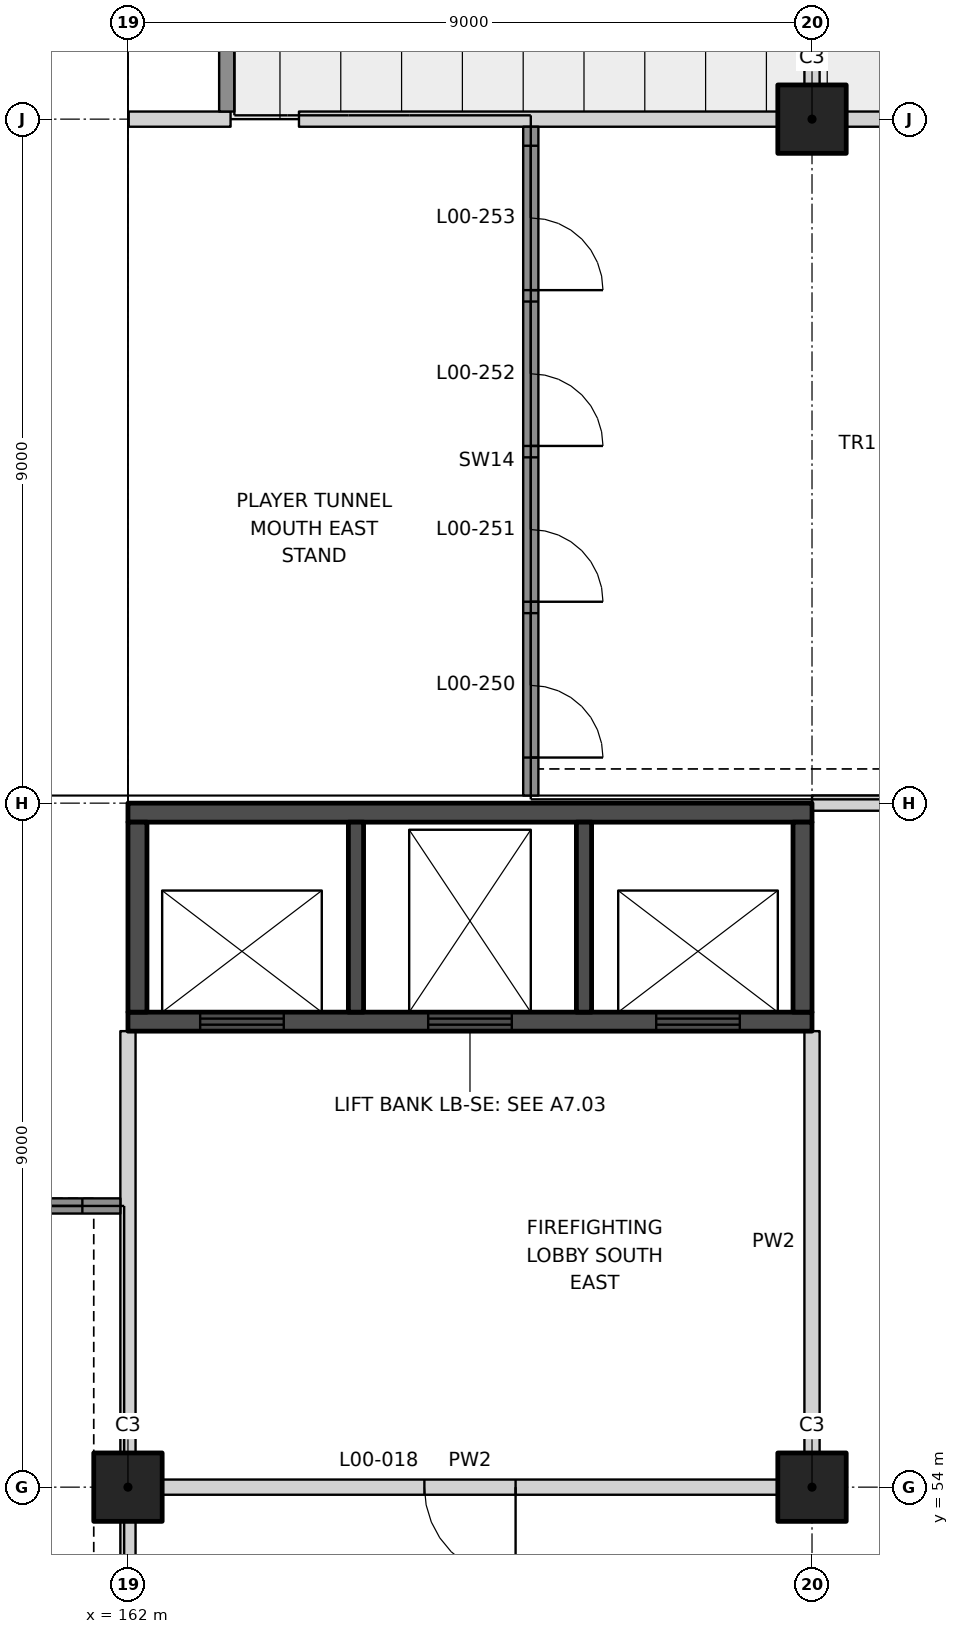
"""IFC4 building model, lengths in metres.
Left out: names, types, materials, properties, quantities, classifications, styles, units other than length and angle.
Written with IfcOpenShell. Run it as: python <this file> out.ifc"""

import sys

from ifc_helpers import new_model, si_unit, direction, frame, frame_2d, origin, origin_2d, place, context, subcontext, project, spatial, polyline, rectangle, outline, extrude, element, fill, save


model = new_model("IFC4")
c1 = context("Model", 3, precision=1e-05, world=origin(), true_north=direction((0.0, 1.0)))
c2 = subcontext(c1, "Body", "Model", "MODEL_VIEW")
j1 = project(units=[si_unit("LENGTHUNIT", "METRE"), si_unit("PLANEANGLEUNIT", "RADIAN")], contexts=[c1])
p1 = place(None, origin())
s1 = spatial("IfcSite", under=j1, at=p1, CompositionType="ELEMENT")
p2 = place(p1, origin())
s2 = spatial("IfcBuilding", under=s1, at=p2, CompositionType="ELEMENT")
p3 = place(p2, origin())
s3 = spatial("IfcBuildingStorey", under=s2, at=p3, CompositionType="ELEMENT", Elevation=0.0)
for number, where, z_axis, x_axis in (
    (1, (162.0, 54.0, 0.0), (0.0, 0.0, 1.0), (1.0, 0.0, 0.0)),
    (2, (171.0, 54.0, 0.0), (0.0, 0.0, 1.0), (1.0, 0.0, 0.0)),
):
    element("IfcColumn", number, at=place(p3, frame(where, z_axis=z_axis, x_axis=x_axis)), inside=s3, PredefinedType="COLUMN", context=c2, shape_type="SweptSolid", body=[
        extrude(rectangle(XDim=0.9, YDim=0.9, at=origin_2d()), origin(), (0.0, 0.0, 1.0), 7.0),
    ])
p4 = place(p3, frame((171.0, 72.0, 0.0), z_axis=(0.0, 0.0, 1.0), x_axis=(1.0, 0.0, 0.0)))
e3 = element("IfcColumn", 3, at=p4, inside=s3, PredefinedType="COLUMN", context=c2, shape_type="SweptSolid", body=[
    extrude(rectangle(XDim=0.9, YDim=0.9, at=origin_2d()), origin(), (0.0, 0.0, 1.0), 3.552),
])
p5 = place(p3, frame((162.45, 54.0, 0.0), z_axis=(0.0, 0.0, 1.0), x_axis=(1.0, 0.0, 0.0)))
e4 = element("IfcWall", 4, at=p5, inside=s3, PredefinedType="PARTITIONING", context=c2, shape_type="SweptSolid", body=[
    extrude(rectangle(XDim=8.1, YDim=0.2, at=frame_2d((4.05, 0.0))), origin(), (0.0, 0.0, 1.0), 5.75),
])
p6 = place(p5, frame((3.45, 0.0, 0.0)))
e5 = element("IfcOpeningElement", 5, at=p6, cuts=e4, PredefinedType="OPENING", context=c2, shape_type="SweptSolid", body=[
    extrude(rectangle(XDim=1.2, YDim=2.1, at=frame_2d((0.6, 1.05))), frame((0.0, 0.11, 0.0), z_axis=(0.0, -1.0, 0.0), x_axis=(1.0, 0.0, 0.0)), (0.0, 0.0, 1.0), 0.22),
])
p7 = place(p3, frame((171.0, 63.0, 0.0), z_axis=(0.0, 0.0, 1.0), x_axis=(1.0, 0.0, 0.0)))
e6 = element("IfcWall", 6, at=p7, inside=s3, PredefinedType="PARTITIONING", context=c2, shape_type="SweptSolid", body=[
    extrude(rectangle(XDim=5.429, YDim=0.2, at=frame_2d((2.714, 0.0))), origin(), (0.0, 0.0, 1.0), 3.439),
])
p8 = place(p7, frame((3.6, 0.0, 0.0)))
e7 = element("IfcOpeningElement", 7, at=p8, cuts=e6, PredefinedType="OPENING", context=c2, shape_type="SweptSolid", body=[
    extrude(rectangle(XDim=1.8, YDim=2.1, at=frame_2d((0.9, 1.05))), frame((0.0, 0.11, 0.0), z_axis=(0.0, -1.0, 0.0), x_axis=(1.0, 0.0, 0.0)), (0.0, 0.0, 1.0), 0.22),
])
p9 = place(p3, frame((164.25, 72.0, 0.0), z_axis=(0.0, 0.0, 1.0), x_axis=(1.0, 0.0, 0.0)))
e8 = element("IfcWall", 8, at=p9, inside=s3, PredefinedType="PARTITIONING", context=c2, shape_type="SweptSolid", body=[
    extrude(outline(polyline([(0.0, 0.0), (6.3, 0.0), (6.3, 3.231), (4.362, 2.311), (0.0, 0.239), (0.0, 0.0)])), frame((0.0, 0.1, 0.0), z_axis=(0.0, -1.0, 0.0), x_axis=(1.0, 0.0, 0.0)), (0.0, 0.0, 1.0), 0.2),
])
p10 = place(p3, frame((162.01, 72.0, 0.0), z_axis=(0.0, 0.0, 1.0), x_axis=(1.0, 0.0, 0.0)))
e9 = element("IfcWall", 9, at=p10, inside=s3, PredefinedType="PARTITIONING", context=c2, shape_type="SweptSolid", body=[
    extrude(outline(polyline([(0.0, 0.0), (1.34, 0.0), (1.34, -0.189), (0.893, 7.0), (0.0, 7.0), (0.0, 0.0)])), frame((0.0, 0.1, 0.0), z_axis=(0.0, -1.0, 0.0), x_axis=(1.0, 0.0, 0.0)), (0.0, 0.0, 1.0), 0.2),
])
p11 = place(p3, frame((171.45, 72.0, 0.0), z_axis=(0.0, 0.0, 1.0), x_axis=(1.0, 0.0, 0.0)))
e10 = element("IfcWall", 10, at=p11, inside=s3, PredefinedType="PARTITIONING", context=c2, shape_type="SweptSolid", body=[
    extrude(rectangle(XDim=4.979, YDim=0.2, at=frame_2d((2.49, 0.0))), origin(), (0.0, 0.0, 1.0), 3.439),
])
p12 = place(p11, frame((3.125, 0.0, 0.0)))
e11 = element("IfcOpeningElement", 11, at=p12, cuts=e10, PredefinedType="OPENING", context=c2, shape_type="SweptSolid", body=[
    extrude(rectangle(XDim=1.8, YDim=2.1, at=frame_2d((0.9, 1.05))), frame((0.0, 0.11, 0.0), z_axis=(0.0, -1.0, 0.0), x_axis=(1.0, 0.0, 0.0)), (0.0, 0.0, 1.0), 0.22),
])
p13 = place(p3, frame((162.0, 48.571, 0.0), z_axis=(0.0, 0.0, 1.0), x_axis=(0.0, 1.0, 0.0)))
e12 = element("IfcWall", 12, at=p13, inside=s3, PredefinedType="PARTITIONING", context=c2, shape_type="SweptSolid", body=[
    extrude(rectangle(XDim=4.979, YDim=0.2, at=frame_2d((2.49, 0.0))), origin(), (0.0, 0.0, 1.0), 3.439),
])
for number, where, z_axis, x_axis in (
    (13, (162.0, 54.45, 0.0), (0.0, 0.0, 1.0), (0.0, 1.0, 0.0)),
    (14, (171.0, 54.45, 0.0), (0.0, 0.0, 1.0), (0.0, 1.0, 0.0)),
):
    element("IfcWall", number, at=place(p3, frame(where, z_axis=z_axis, x_axis=x_axis)), inside=s3, PredefinedType="PARTITIONING", context=c2, shape_type="SweptSolid", body=[
        extrude(rectangle(XDim=5.55, YDim=0.2, at=frame_2d((2.775, 0.0))), origin(), (0.0, 0.0, 1.0), 5.95),
    ])
p14 = place(p3, frame((171.0, 72.45, 0.0), z_axis=(0.0, 0.0, 1.0), x_axis=(0.0, 1.0, 0.0)))
e15 = element("IfcWall", 15, at=p14, inside=s3, PredefinedType="PARTITIONING", context=c2, shape_type="SweptSolid", body=[
    extrude(rectangle(XDim=8.1, YDim=0.2, at=frame_2d((4.05, 0.0))), origin(), (0.0, 0.0, 1.0), 4.445),
])
p15 = place(p3, frame((162.0, 60.125, 0.0), z_axis=(0.0, 0.0, 1.0), x_axis=(1.0, 0.0, 0.0)))
e16 = element("IfcWall", 16, at=p15, inside=s3, PredefinedType="SHEAR", context=c2, shape_type="SweptSolid", body=[
    extrude(rectangle(XDim=9.0, YDim=0.25, at=frame_2d((4.5, 0.0))), origin(), (0.0, 0.0, 1.0), 7.0),
])
p16 = place(p15, frame((0.95, 0.0, 0.0)))
e17 = element("IfcOpeningElement", 17, at=p16, cuts=e16, PredefinedType="OPENING", context=c2, shape_type="SweptSolid", body=[
    extrude(rectangle(XDim=1.1, YDim=2.1, at=frame_2d((0.55, 1.05))), frame((0.0, 0.135, 0.0), z_axis=(0.0, -1.0, 0.0), x_axis=(1.0, 0.0, 0.0)), (0.0, 0.0, 1.0), 0.27),
])
p17 = place(p15, frame((3.95, 0.0, 0.0)))
e18 = element("IfcOpeningElement", 18, at=p17, cuts=e16, PredefinedType="OPENING", context=c2, shape_type="SweptSolid", body=[
    extrude(rectangle(XDim=1.1, YDim=2.1, at=frame_2d((0.55, 1.05))), frame((0.0, 0.135, 0.0), z_axis=(0.0, -1.0, 0.0), x_axis=(1.0, 0.0, 0.0)), (0.0, 0.0, 1.0), 0.27),
])
p18 = place(p15, frame((6.95, 0.0, 0.0)))
e19 = element("IfcOpeningElement", 19, at=p18, cuts=e16, PredefinedType="OPENING", context=c2, shape_type="SweptSolid", body=[
    extrude(rectangle(XDim=1.1, YDim=2.1, at=frame_2d((0.55, 1.05))), frame((0.0, 0.135, 0.0), z_axis=(0.0, -1.0, 0.0), x_axis=(1.0, 0.0, 0.0)), (0.0, 0.0, 1.0), 0.27),
])
p19 = place(p3, frame((162.0, 62.875, 0.0), z_axis=(0.0, 0.0, 1.0), x_axis=(1.0, 0.0, 0.0)))
e20 = element("IfcWall", 20, at=p19, inside=s3, PredefinedType="SHEAR", context=c2, shape_type="SweptSolid", body=[
    extrude(rectangle(XDim=9.0, YDim=0.25, at=frame_2d((4.5, 0.0))), origin(), (0.0, 0.0, 1.0), 7.0),
])
for number, where, z_axis, x_axis in (
    (21, (162.125, 60.25, 0.0), (0.0, 0.0, 1.0), (0.0, 1.0, 0.0)),
    (22, (170.875, 60.25, 0.0), (0.0, 0.0, 1.0), (0.0, 1.0, 0.0)),
):
    element("IfcWall", number, at=place(p3, frame(where, z_axis=z_axis, x_axis=x_axis)), inside=s3, PredefinedType="SHEAR", context=c2, shape_type="SweptSolid", body=[
        extrude(rectangle(XDim=2.5, YDim=0.25, at=frame_2d((1.25, 0.0))), origin(), (0.0, 0.0, 1.0), 7.0),
    ])
for number, where, z_axis, x_axis in (
    (23, (165.0, 60.25, 0.0), (0.0, 0.0, 1.0), (0.0, 1.0, 0.0)),
    (24, (168.0, 60.25, 0.0), (0.0, 0.0, 1.0), (0.0, 1.0, 0.0)),
):
    element("IfcWall", number, at=place(p3, frame(where, z_axis=z_axis, x_axis=x_axis)), inside=s3, PredefinedType="SHEAR", context=c2, shape_type="SweptSolid", body=[
        extrude(rectangle(XDim=2.5, YDim=0.2, at=frame_2d((1.25, 0.0))), origin(), (0.0, 0.0, 1.0), 7.0),
    ])
p20 = place(p3, frame((153.1, 57.7, 0.0), z_axis=(0.0, 0.0, 1.0), x_axis=(1.0, 0.0, 0.0)))
e25 = element("IfcWall", 25, at=p20, inside=s3, PredefinedType="SOLIDWALL", context=c2, shape_type="SweptSolid", body=[
    extrude(rectangle(XDim=8.8, YDim=0.2, at=frame_2d((4.4, 0.0))), origin(), (0.0, 0.0, 1.0), 2.64),
])
p21 = place(p20, frame((0.25, 0.0, 0.0)))
e26 = element("IfcOpeningElement", 26, at=p21, cuts=e25, PredefinedType="OPENING", context=c2, shape_type="SweptSolid", body=[
    extrude(rectangle(XDim=1.9, YDim=2.1, at=frame_2d((0.95, 1.05))), frame((0.0, 0.11, 0.0), z_axis=(0.0, -1.0, 0.0), x_axis=(1.0, 0.0, 0.0)), (0.0, 0.0, 1.0), 0.22),
])
p22 = place(p20, frame((2.3, 0.0, 0.0)))
e27 = element("IfcOpeningElement", 27, at=p22, cuts=e25, PredefinedType="OPENING", context=c2, shape_type="SweptSolid", body=[
    extrude(rectangle(XDim=1.9, YDim=2.1, at=frame_2d((0.95, 1.05))), frame((0.0, 0.11, 0.0), z_axis=(0.0, -1.0, 0.0), x_axis=(1.0, 0.0, 0.0)), (0.0, 0.0, 1.0), 0.22),
])
p23 = place(p20, frame((4.35, 0.0, 0.0)))
e28 = element("IfcOpeningElement", 28, at=p23, cuts=e25, PredefinedType="OPENING", context=c2, shape_type="SweptSolid", body=[
    extrude(rectangle(XDim=1.9, YDim=2.1, at=frame_2d((0.95, 1.05))), frame((0.0, 0.11, 0.0), z_axis=(0.0, -1.0, 0.0), x_axis=(1.0, 0.0, 0.0)), (0.0, 0.0, 1.0), 0.22),
])
p24 = place(p20, frame((6.4, 0.0, 0.0)))
e29 = element("IfcOpeningElement", 29, at=p24, cuts=e25, PredefinedType="OPENING", context=c2, shape_type="SweptSolid", body=[
    extrude(rectangle(XDim=1.9, YDim=2.1, at=frame_2d((0.95, 1.05))), frame((0.0, 0.11, 0.0), z_axis=(0.0, -1.0, 0.0), x_axis=(1.0, 0.0, 0.0)), (0.0, 0.0, 1.0), 0.22),
])
p25 = place(p3, frame((167.3, 63.1, 0.0), z_axis=(0.0, 0.0, 1.0), x_axis=(0.0, 1.0, 0.0)))
e30 = element("IfcWall", 30, at=p25, inside=s3, PredefinedType="SOLIDWALL", context=c2, shape_type="SweptSolid", body=[
    extrude(rectangle(XDim=8.8, YDim=0.2, at=frame_2d((4.4, 0.0))), origin(), (0.0, 0.0, 1.0), 2.64),
])
p26 = place(p25, frame((0.5, 0.0, 0.0)))
e31 = element("IfcOpeningElement", 31, at=p26, cuts=e30, PredefinedType="OPENING", context=c2, shape_type="SweptSolid", body=[
    extrude(rectangle(XDim=1.9, YDim=2.1, at=frame_2d((0.95, 1.05))), frame((0.0, 0.11, 0.0), z_axis=(0.0, -1.0, 0.0), x_axis=(1.0, 0.0, 0.0)), (0.0, 0.0, 1.0), 0.22),
])
p27 = place(p25, frame((2.55, 0.0, 0.0)))
e32 = element("IfcOpeningElement", 32, at=p27, cuts=e30, PredefinedType="OPENING", context=c2, shape_type="SweptSolid", body=[
    extrude(rectangle(XDim=1.9, YDim=2.1, at=frame_2d((0.95, 1.05))), frame((0.0, 0.11, 0.0), z_axis=(0.0, -1.0, 0.0), x_axis=(1.0, 0.0, 0.0)), (0.0, 0.0, 1.0), 0.22),
])
p28 = place(p25, frame((4.6, 0.0, 0.0)))
e33 = element("IfcOpeningElement", 33, at=p28, cuts=e30, PredefinedType="OPENING", context=c2, shape_type="SweptSolid", body=[
    extrude(rectangle(XDim=1.9, YDim=2.1, at=frame_2d((0.95, 1.05))), frame((0.0, 0.11, 0.0), z_axis=(0.0, -1.0, 0.0), x_axis=(1.0, 0.0, 0.0)), (0.0, 0.0, 1.0), 0.22),
])
p29 = place(p25, frame((6.65, 0.0, 0.0)))
e34 = element("IfcOpeningElement", 34, at=p29, cuts=e30, PredefinedType="OPENING", context=c2, shape_type="SweptSolid", body=[
    extrude(rectangle(XDim=1.9, YDim=2.1, at=frame_2d((0.95, 1.05))), frame((0.0, 0.11, 0.0), z_axis=(0.0, -1.0, 0.0), x_axis=(1.0, 0.0, 0.0)), (0.0, 0.0, 1.0), 0.22),
])
p30 = place(p3, frame((163.3, 72.1, 0.0), z_axis=(0.0, 0.0, 1.0), x_axis=(0.0, 1.0, 0.0)))
e35 = element("IfcWall", 35, at=p30, inside=s3, PredefinedType="SOLIDWALL", context=c2, shape_type="SweptSolid", body=[
    extrude(rectangle(XDim=7.4, YDim=0.2, at=frame_2d((3.7, 0.0))), origin(), (0.0, 0.0, 1.0), 0.74),
])
p31 = place(p6, frame((1.2, 0.0, 0.0), z_axis=(0.0, 0.0, 1.0), x_axis=(-1.0, 0.0, 0.0)))
e36 = element("IfcDoor", 36, at=p31, inside=s3, OperationType="SINGLE_SWING_LEFT", PredefinedType="DOOR", context=c2, shape_type="SweptSolid", body=[
    extrude(rectangle(XDim=1.2, YDim=2.1, at=frame_2d((0.6, 1.05))), frame((0.0, 0.025, 0.0), z_axis=(0.0, -1.0, 0.0), x_axis=(1.0, 0.0, 0.0)), (0.0, 0.0, 1.0), 0.05),
])
fill(e5, e36)
p32 = place(p16, origin())
e37 = element("IfcDoor", 37, at=p32, inside=s3, OperationType="DOUBLE_DOOR_SLIDING", PredefinedType="DOOR", context=c2, shape_type="SweptSolid", body=[
    extrude(rectangle(XDim=1.1, YDim=2.1, at=frame_2d((0.55, 1.05))), frame((0.0, 0.025, 0.0), z_axis=(0.0, -1.0, 0.0), x_axis=(1.0, 0.0, 0.0)), (0.0, 0.0, 1.0), 0.05),
])
fill(e17, e37)
p33 = place(p17, origin())
e38 = element("IfcDoor", 38, at=p33, inside=s3, OperationType="DOUBLE_DOOR_SLIDING", PredefinedType="DOOR", context=c2, shape_type="SweptSolid", body=[
    extrude(rectangle(XDim=1.1, YDim=2.1, at=frame_2d((0.55, 1.05))), frame((0.0, 0.025, 0.0), z_axis=(0.0, -1.0, 0.0), x_axis=(1.0, 0.0, 0.0)), (0.0, 0.0, 1.0), 0.05),
])
fill(e18, e38)
p34 = place(p18, origin())
e39 = element("IfcDoor", 39, at=p34, inside=s3, OperationType="DOUBLE_DOOR_SLIDING", PredefinedType="DOOR", context=c2, shape_type="SweptSolid", body=[
    extrude(rectangle(XDim=1.1, YDim=2.1, at=frame_2d((0.55, 1.05))), frame((0.0, 0.025, 0.0), z_axis=(0.0, -1.0, 0.0), x_axis=(1.0, 0.0, 0.0)), (0.0, 0.0, 1.0), 0.05),
])
fill(e19, e39)
p35 = place(p24, frame((1.9, 0.0, 0.0), z_axis=(0.0, 0.0, 1.0), x_axis=(-1.0, 0.0, 0.0)))
e40 = element("IfcDoor", 40, at=p35, inside=s3, OperationType="DOUBLE_DOOR_SINGLE_SWING", PredefinedType="DOOR", context=c2, shape_type="SweptSolid", body=[
    extrude(rectangle(XDim=1.9, YDim=2.1, at=frame_2d((0.95, 1.05))), frame((0.0, 0.025, 0.0), z_axis=(0.0, -1.0, 0.0), x_axis=(1.0, 0.0, 0.0)), (0.0, 0.0, 1.0), 0.05),
])
fill(e29, e40)
p36 = place(p26, frame((1.9, 0.0, 0.0), z_axis=(0.0, 0.0, 1.0), x_axis=(-1.0, 0.0, 0.0)))
e41 = element("IfcDoor", 41, at=p36, inside=s3, OperationType="DOUBLE_DOOR_SINGLE_SWING", PredefinedType="DOOR", context=c2, shape_type="SweptSolid", body=[
    extrude(rectangle(XDim=1.9, YDim=2.1, at=frame_2d((0.95, 1.05))), frame((0.0, 0.025, 0.0), z_axis=(0.0, -1.0, 0.0), x_axis=(1.0, 0.0, 0.0)), (0.0, 0.0, 1.0), 0.05),
])
fill(e31, e41)
p37 = place(p27, frame((1.9, 0.0, 0.0), z_axis=(0.0, 0.0, 1.0), x_axis=(-1.0, 0.0, 0.0)))
e42 = element("IfcDoor", 42, at=p37, inside=s3, OperationType="DOUBLE_DOOR_SINGLE_SWING", PredefinedType="DOOR", context=c2, shape_type="SweptSolid", body=[
    extrude(rectangle(XDim=1.9, YDim=2.1, at=frame_2d((0.95, 1.05))), frame((0.0, 0.025, 0.0), z_axis=(0.0, -1.0, 0.0), x_axis=(1.0, 0.0, 0.0)), (0.0, 0.0, 1.0), 0.05),
])
fill(e32, e42)
p38 = place(p28, frame((1.9, 0.0, 0.0), z_axis=(0.0, 0.0, 1.0), x_axis=(-1.0, 0.0, 0.0)))
e43 = element("IfcDoor", 43, at=p38, inside=s3, OperationType="DOUBLE_DOOR_SINGLE_SWING", PredefinedType="DOOR", context=c2, shape_type="SweptSolid", body=[
    extrude(rectangle(XDim=1.9, YDim=2.1, at=frame_2d((0.95, 1.05))), frame((0.0, 0.025, 0.0), z_axis=(0.0, -1.0, 0.0), x_axis=(1.0, 0.0, 0.0)), (0.0, 0.0, 1.0), 0.05),
])
fill(e33, e43)
p39 = place(p29, frame((1.9, 0.0, 0.0), z_axis=(0.0, 0.0, 1.0), x_axis=(-1.0, 0.0, 0.0)))
e44 = element("IfcDoor", 44, at=p39, inside=s3, OperationType="DOUBLE_DOOR_SINGLE_SWING", PredefinedType="DOOR", context=c2, shape_type="SweptSolid", body=[
    extrude(rectangle(XDim=1.9, YDim=2.1, at=frame_2d((0.95, 1.05))), frame((0.0, 0.025, 0.0), z_axis=(0.0, -1.0, 0.0), x_axis=(1.0, 0.0, 0.0)), (0.0, 0.0, 1.0), 0.05),
])
fill(e34, e44)
save(model, sys.argv[1])
